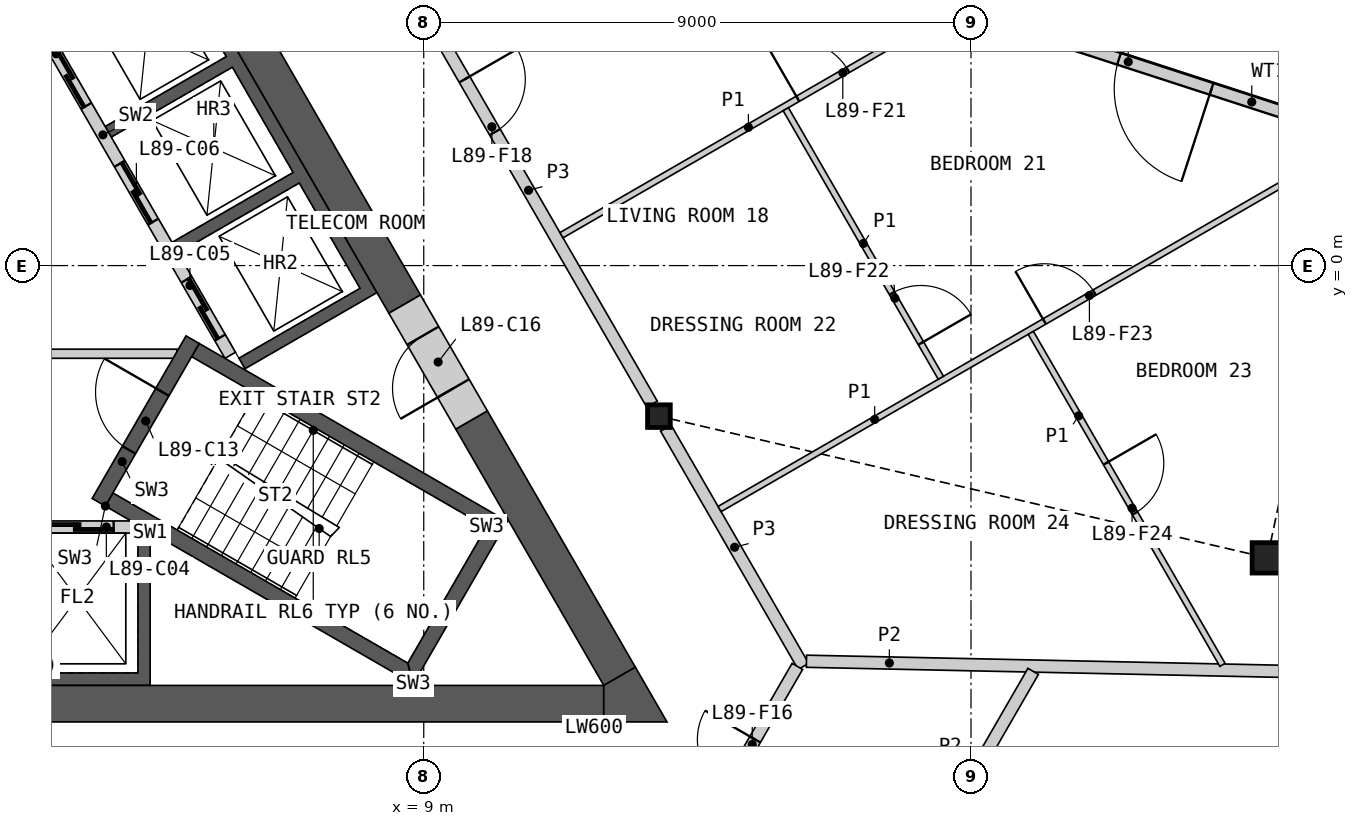
"""IFC4 building model, lengths in metres.
Left out: names, types, materials, properties, quantities, classifications, styles, units other than length and angle.
Written with IfcOpenShell. Run it as: python <this file> out.ifc"""

import sys

from ifc_helpers import new_model, si_unit, direction, frame, frame_2d, origin, origin_2d, place, context, subcontext, project, spatial, polyline, rectangle, hollow_rectangle, i_section, outline, extrude, element, fill, save


model = new_model("IFC4")
c1 = context("Model", 3, precision=1e-05, world=origin(), true_north=direction((0.0, 1.0)))
c2 = subcontext(c1, "Body", "Model", "MODEL_VIEW")
j1 = project(units=[si_unit("LENGTHUNIT", "METRE"), si_unit("PLANEANGLEUNIT", "RADIAN")], contexts=[c1])
p1 = place(None, origin())
s1 = spatial("IfcSite", under=j1, at=p1, CompositionType="ELEMENT")
p2 = place(p1, origin())
s2 = spatial("IfcBuilding", under=s1, at=p2, CompositionType="ELEMENT")
p3 = place(p2, frame((0.0, 0.0, 391.6)))
s3 = spatial("IfcBuildingStorey", under=s2, at=p3, CompositionType="ELEMENT", Elevation=391.6)
p4 = place(p3, frame((22.874, -4.807, 0.0), z_axis=(0.0, 0.0, 1.0), x_axis=(1.0, 0.0, 0.0)))
e1 = element("IfcColumn", 1, at=p4, inside=s3, PredefinedType="COLUMN", context=c2, shape_type="SweptSolid", body=[
    extrude(hollow_rectangle(XDim=0.5, YDim=0.5, WallThickness=0.03, at=origin_2d()), origin(), (0.0, 0.0, 1.0), 3.4),
])
p5 = place(p3, frame((12.868, -2.476, 0.0), z_axis=(0.0, 0.0, 1.0), x_axis=(1.0, 0.0, 0.0)))
e2 = element("IfcColumn", 2, at=p5, inside=s3, PredefinedType="COLUMN", context=c2, shape_type="SweptSolid", body=[
    extrude(i_section(OverallWidth=0.374, OverallDepth=0.372, WebThickness=0.016, FlangeThickness=0.026, at=origin_2d()), origin(), (0.0, 0.0, 1.0), 3.4),
])
p6 = place(p3, frame((24.174, 2.185, 0.0), z_axis=(0.0, 0.0, 1.0), x_axis=(-0.951061473407, 0.309001737536, 0.0)))
e3 = element("IfcWall", 3, at=p6, inside=s3, PredefinedType="SOLIDWALL", context=c2, shape_type="SweptSolid", body=[
    extrude(rectangle(XDim=6.546, YDim=0.2, at=frame_2d((3.273, 0.0))), origin(), (0.0, 0.0, 1.0), 2.634),
])
p7 = place(p6, frame((2.333, 0.0, 0.0)))
e4 = element("IfcOpeningElement", 4, at=p7, cuts=e3, PredefinedType="OPENING", context=c2, shape_type="SweptSolid", body=[
    extrude(rectangle(XDim=1.6, YDim=2.25, at=frame_2d((0.8, 1.125))), frame((0.0, 0.11, 0.0), z_axis=(0.0, -1.0, 0.0), x_axis=(1.0, 0.0, 0.0)), (0.0, 0.0, 1.0), 0.22),
])
p8 = place(p3, origin())
e5 = element("IfcWall", 5, at=p8, inside=s3, PredefinedType="SHEAR", context=c2, shape_type="SweptSolid", body=[
    extrude(outline(polyline([(4.5, -4.4), (4.5, -6.906), (-4.5, -6.906), (-4.5, -4.4), (-4.3, -4.4), (-4.3, -6.7), (-2.3, -6.7), (-2.3, -4.4), (-2.1, -4.4), (-2.1, -6.7), (-0.1, -6.7), (-0.1, -4.4), (0.1, -4.4), (0.1, -6.7), (2.1, -6.7), (2.1, -4.4), (2.3, -4.4), (2.3, -6.7), (4.3, -6.7), (4.3, -4.4), (4.5, -4.4)])), origin(), (0.0, 0.0, 1.0), 3.1),
])
p9 = place(p3, frame((-4.187, -4.3, 0.0), z_axis=(0.0, 0.0, 1.0), x_axis=(1.0, 0.0, 0.0)))
e6 = element("IfcWall", 6, at=p9, inside=s3, PredefinedType="SOLIDWALL", context=c2, shape_type="SweptSolid", body=[
    extrude(rectangle(XDim=8.373, YDim=0.2, at=frame_2d((4.187, 0.0))), origin(), (0.0, 0.0, 1.0), 3.1),
])
p10 = place(p9, frame((0.287, 0.0, 0.0)))
e7 = element("IfcOpeningElement", 7, at=p10, cuts=e6, PredefinedType="OPENING", context=c2, shape_type="SweptSolid", body=[
    extrude(rectangle(XDim=1.2, YDim=2.1, at=frame_2d((0.6, 1.05))), frame((0.0, 0.11, 0.0), z_axis=(0.0, -1.0, 0.0), x_axis=(1.0, 0.0, 0.0)), (0.0, 0.0, 1.0), 0.22),
])
p11 = place(p9, frame((2.387, 0.0, 0.0)))
e8 = element("IfcOpeningElement", 8, at=p11, cuts=e6, PredefinedType="OPENING", context=c2, shape_type="SweptSolid", body=[
    extrude(rectangle(XDim=1.4, YDim=2.1, at=frame_2d((0.7, 1.05))), frame((0.0, 0.11, 0.0), z_axis=(0.0, -1.0, 0.0), x_axis=(1.0, 0.0, 0.0)), (0.0, 0.0, 1.0), 0.22),
])
p12 = place(p9, frame((4.737, 0.0, 0.0)))
e9 = element("IfcOpeningElement", 9, at=p12, cuts=e6, PredefinedType="OPENING", context=c2, shape_type="SweptSolid", body=[
    extrude(rectangle(XDim=1.1, YDim=2.1, at=frame_2d((0.55, 1.05))), frame((0.0, 0.11, 0.0), z_axis=(0.0, -1.0, 0.0), x_axis=(1.0, 0.0, 0.0)), (0.0, 0.0, 1.0), 0.22),
])
p13 = place(p9, frame((6.887, 0.0, 0.0)))
e10 = element("IfcOpeningElement", 10, at=p13, cuts=e6, PredefinedType="OPENING", context=c2, shape_type="SweptSolid", body=[
    extrude(rectangle(XDim=1.2, YDim=2.1, at=frame_2d((0.6, 1.05))), frame((0.0, 0.11, 0.0), z_axis=(0.0, -1.0, 0.0), x_axis=(1.0, 0.0, 0.0)), (0.0, 0.0, 1.0), 0.22),
])
p14 = place(p3, origin())
e11 = element("IfcWall", 11, at=p14, inside=s3, PredefinedType="SHEAR", context=c2, shape_type="SweptSolid", body=[
    extrude(outline(polyline([(1.561, 6.097), (3.731, 7.35), (8.231, -0.444), (6.061, -1.697), (5.96, -1.524), (7.952, -0.374), (6.952, 1.358), (4.96, 0.208), (4.861, 0.381), (6.852, 1.531), (5.852, 3.263), (3.861, 2.113), (3.76, 2.287), (5.752, 3.437), (4.752, 5.169), (2.76, 4.019), (2.66, 4.192), (4.652, 5.342), (3.652, 7.074), (1.66, 5.924), (1.561, 6.097)])), origin(), (0.0, 0.0, 1.0), 3.1),
])
p15 = place(p3, frame((5.817, -1.476, 0.0), z_axis=(0.0, 0.0, 1.0), x_axis=(-0.500002616675, 0.866023893041, 0.0)))
e12 = element("IfcWall", 12, at=p15, inside=s3, PredefinedType="SOLIDWALL", context=c2, shape_type="SweptSolid", body=[
    extrude(rectangle(XDim=8.373, YDim=0.2, at=frame_2d((4.187, 0.0))), origin(), (0.0, 0.0, 1.0), 3.1),
])
p16 = place(p15, frame((0.337, 0.0, 0.0)))
e13 = element("IfcOpeningElement", 13, at=p16, cuts=e12, PredefinedType="OPENING", context=c2, shape_type="SweptSolid", body=[
    extrude(rectangle(XDim=1.1, YDim=2.1, at=frame_2d((0.55, 1.05))), frame((0.0, 0.11, 0.0), z_axis=(0.0, -1.0, 0.0), x_axis=(1.0, 0.0, 0.0)), (0.0, 0.0, 1.0), 0.22),
])
p17 = place(p15, frame((2.537, 0.0, 0.0)))
e14 = element("IfcOpeningElement", 14, at=p17, cuts=e12, PredefinedType="OPENING", context=c2, shape_type="SweptSolid", body=[
    extrude(rectangle(XDim=1.1, YDim=2.1, at=frame_2d((0.55, 1.05))), frame((0.0, 0.11, 0.0), z_axis=(0.0, -1.0, 0.0), x_axis=(1.0, 0.0, 0.0)), (0.0, 0.0, 1.0), 0.22),
])
p18 = place(p15, frame((4.737, 0.0, 0.0)))
e15 = element("IfcOpeningElement", 15, at=p18, cuts=e12, PredefinedType="OPENING", context=c2, shape_type="SweptSolid", body=[
    extrude(rectangle(XDim=1.1, YDim=2.1, at=frame_2d((0.55, 1.05))), frame((0.0, 0.11, 0.0), z_axis=(0.0, -1.0, 0.0), x_axis=(1.0, 0.0, 0.0)), (0.0, 0.0, 1.0), 0.22),
])
p19 = place(p15, frame((7.037, 0.0, 0.0)))
e16 = element("IfcOpeningElement", 16, at=p19, cuts=e12, PredefinedType="OPENING", context=c2, shape_type="SweptSolid", body=[
    extrude(rectangle(XDim=0.9, YDim=2.1, at=frame_2d((0.45, 1.05))), frame((0.0, 0.11, 0.0), z_axis=(0.0, -1.0, 0.0), x_axis=(1.0, 0.0, 0.0)), (0.0, 0.0, 1.0), 0.22),
])
p20 = place(p3, frame((-4.941, -1.45, 0.0), z_axis=(0.0, 0.0, 1.0), x_axis=(1.0, 0.0, 0.0)))
e17 = element("IfcWall", 17, at=p20, inside=s3, PredefinedType="PARTITIONING", context=c2, shape_type="SweptSolid", body=[
    extrude(rectangle(XDim=9.882, YDim=0.15, at=frame_2d((4.941, 0.0))), origin(), (0.0, 0.0, 1.0), 3.1),
])
p21 = place(p20, frame((4.391, 0.0, 0.0)))
e18 = element("IfcOpeningElement", 18, at=p21, cuts=e17, PredefinedType="OPENING", context=c2, shape_type="SweptSolid", body=[
    extrude(rectangle(XDim=1.1, YDim=2.1, at=frame_2d((0.55, 1.05))), frame((0.0, 0.085, 0.0), z_axis=(0.0, -1.0, 0.0), x_axis=(1.0, 0.0, 0.0)), (0.0, 0.0, 1.0), 0.17),
])
p22 = place(p3, origin())
e19 = element("IfcWall", 19, at=p22, inside=s3, PredefinedType="SHEAR", context=c2, shape_type="SweptSolid", body=[
    extrude(outline(polyline([(3.763, -3.956), (8.83, -6.881), (8.738, -6.539), (3.888, -3.739), (3.763, -3.956)])), origin(), (0.0, 0.0, 1.0), 3.1),
])
p23 = place(p3, origin())
e20 = element("IfcWall", 20, at=p23, inside=s3, PredefinedType="SHEAR", context=c2, shape_type="SweptSolid", body=[
    extrude(outline(polyline([(8.83, -6.881), (10.374, -4.206), (10.032, -4.298), (8.738, -6.539), (8.83, -6.881)])), origin(), (0.0, 0.0, 1.0), 3.1),
])
p24 = place(p3, origin())
e21 = element("IfcWall", 21, at=p24, inside=s3, PredefinedType="SHEAR", context=c2, shape_type="SweptSolid", body=[
    extrude(outline(polyline([(10.032, -4.298), (10.374, -4.206), (5.307, -1.281), (5.182, -1.498), (10.032, -4.298)])), origin(), (0.0, 0.0, 1.0), 3.1),
])
p25 = place(p3, frame((3.655, -3.893, 0.0), z_axis=(0.0, 0.0, 1.0), x_axis=(0.499982516597, 0.866035497597, 0.0)))
e22 = element("IfcWall", 22, at=p25, inside=s3, PredefinedType="SHEAR", context=c2, shape_type="SweptSolid", body=[
    extrude(rectangle(XDim=3.088, YDim=0.25, at=frame_2d((1.544, 0.0))), origin(), (0.0, 0.0, 1.0), 3.1),
])
p26 = place(p25, frame((0.994, 0.0, 0.0)))
e23 = element("IfcOpeningElement", 23, at=p26, cuts=e22, PredefinedType="OPENING", context=c2, shape_type="SweptSolid", body=[
    extrude(rectangle(XDim=1.1, YDim=2.1, at=frame_2d((0.55, 1.05))), frame((0.0, 0.135, 0.0), z_axis=(0.0, -1.0, 0.0), x_axis=(1.0, 0.0, 0.0)), (0.0, 0.0, 1.0), 0.27),
])
p27 = place(p3, frame((-11.961, -7.206, 0.0), z_axis=(0.0, 0.0, 1.0), x_axis=(1.0, 0.0, 0.0)))
e24 = element("IfcWall", 24, at=p27, inside=s3, PredefinedType="SHEAR", context=c2, shape_type="SweptSolid", body=[
    extrude(rectangle(XDim=23.921, YDim=0.6, at=frame_2d((11.961, 0.0))), origin(), (0.0, 0.0, 1.0), 3.1),
])
p28 = place(p3, frame((8.686, -0.634, 0.0), z_axis=(0.0, 0.0, 1.0), x_axis=(-0.50001836461, 0.866014800712, 0.0)))
e25 = element("IfcWall", 25, at=p28, inside=s3, PredefinedType="SHEAR", context=c2, shape_type="SweptSolid", body=[
    extrude(rectangle(XDim=10.451, YDim=0.6, at=frame_2d((5.225, 0.0))), origin(), (0.0, 0.0, 1.0), 3.1),
])
p29 = place(p3, frame((12.221, -6.756, 0.0), z_axis=(0.0, 0.0, 1.0), x_axis=(-0.50000604952, 0.866021911064, 0.0)))
e26 = element("IfcWall", 26, at=p29, inside=s3, PredefinedType="SHEAR", context=c2, shape_type="SweptSolid", body=[
    extrude(rectangle(XDim=4.869, YDim=0.6, at=frame_2d((2.434, 0.0))), origin(), (0.0, 0.0, 1.0), 3.1),
])
p30 = place(p3, origin())
e27 = element("IfcWall", 27, at=p30, inside=s3, PredefinedType="SHEAR", context=c2, shape_type="SweptSolid", body=[
    extrude(outline(polyline([(11.961, -7.506), (11.961, -6.906), (12.48, -6.606), (13.0, -7.506), (11.961, -7.506)])), origin(), (0.0, 0.0, 1.0), 3.1),
])
p31 = place(p3, frame((9.786, -2.539, 0.0), z_axis=(0.0, 0.0, 1.0), x_axis=(-0.499981787252, 0.866035918664, 0.0)))
e28 = element("IfcWall", 28, at=p31, inside=s3, PredefinedType="SHEAR", context=c2, shape_type="SweptSolid", body=[
    extrude(rectangle(XDim=2.2, YDim=0.6, at=frame_2d((1.1, 0.0))), origin(), (0.0, 0.0, 1.0), 3.1),
])
p32 = place(p31, frame((0.6, 0.0, 0.0)))
e29 = element("IfcOpeningElement", 29, at=p32, cuts=e28, PredefinedType="OPENING", context=c2, shape_type="SweptSolid", body=[
    extrude(rectangle(XDim=1.0, YDim=2.1, at=frame_2d((0.5, 1.05))), frame((0.0, 0.31, 0.0), z_axis=(0.0, -1.0, 0.0), x_axis=(1.0, 0.0, 0.0)), (0.0, 0.0, 1.0), 0.62),
])
p33 = place(p3, frame((8.692, 4.756, 0.0), z_axis=(0.0, 0.0, 1.0), x_axis=(0.500001682468, -0.866024432409, 0.0)))
e30 = element("IfcWall", 30, at=p33, inside=s3, PredefinedType="PARTITIONING", context=c2, shape_type="SweptSolid", body=[
    extrude(rectangle(XDim=8.124, YDim=0.2, at=frame_2d((4.062, 0.0))), origin(), (0.0, 0.0, 1.0), 3.1),
])
p34 = place(p33, frame((1.956, 0.0, 0.0)))
e31 = element("IfcOpeningElement", 31, at=p34, cuts=e30, PredefinedType="OPENING", context=c2, shape_type="SweptSolid", body=[
    extrude(rectangle(XDim=1.0, YDim=2.1, at=frame_2d((0.5, 1.05))), frame((0.0, 0.11, 0.0), z_axis=(0.0, -1.0, 0.0), x_axis=(1.0, 0.0, 0.0)), (0.0, 0.0, 1.0), 0.22),
])
p35 = place(p3, frame((12.981, -2.673, 0.0), z_axis=(0.0, 0.0, 1.0), x_axis=(0.499974648164, -0.866040040179, 0.0)))
e32 = element("IfcWall", 32, at=p35, inside=s3, PredefinedType="PARTITIONING", context=c2, shape_type="SweptSolid", body=[
    extrude(rectangle(XDim=4.525, YDim=0.2, at=frame_2d((2.263, 0.0))), origin(), (0.0, 0.0, 1.0), 3.1),
])
p36 = place(p3, frame((13.281, -9.819, 0.0), z_axis=(0.0, 0.0, 1.0), x_axis=(0.499958791762, 0.866049194065, 0.0)))
e33 = element("IfcWall", 33, at=p36, inside=s3, PredefinedType="PARTITIONING", context=c2, shape_type="SweptSolid", body=[
    extrude(rectangle(XDim=3.726, YDim=0.2, at=frame_2d((1.863, 0.0))), origin(), (0.0, 0.0, 1.0), 3.1),
])
p37 = place(p36, frame((1.388, 0.0, 0.0)))
e34 = element("IfcOpeningElement", 34, at=p37, cuts=e33, PredefinedType="OPENING", context=c2, shape_type="SweptSolid", body=[
    extrude(rectangle(XDim=0.95, YDim=2.1, at=frame_2d((0.475, 1.05))), frame((0.0, 0.11, 0.0), z_axis=(0.0, -1.0, 0.0), x_axis=(1.0, 0.0, 0.0)), (0.0, 0.0, 1.0), 0.22),
])
p38 = place(p3, frame((15.294, -6.508, 0.0), z_axis=(0.0, 0.0, 1.0), x_axis=(0.999775726416, -0.02117774467, 0.0)))
e35 = element("IfcWall", 35, at=p38, inside=s3, PredefinedType="PARTITIONING", context=c2, shape_type="SweptSolid", body=[
    extrude(rectangle(XDim=13.638, YDim=0.2, at=frame_2d((6.819, 0.0))), origin(), (0.0, 0.0, 1.0), 2.33),
])
p39 = place(p3, frame((17.271, -9.708, 0.0), z_axis=(0.0, 0.0, 1.0), x_axis=(0.499983843005, 0.866034731829, 0.0)))
e36 = element("IfcWall", 36, at=p39, inside=s3, PredefinedType="PARTITIONING", context=c2, shape_type="SweptSolid", body=[
    extrude(rectangle(XDim=3.503, YDim=0.2, at=frame_2d((1.752, 0.0))), origin(), (0.0, 0.0, 1.0), 2.33),
])
p40 = place(p3, frame((13.865, -4.004, 0.0), z_axis=(0.0, 0.0, 1.0), x_axis=(0.866023404247, 0.500003463284, 0.0)))
e37 = element("IfcWall", 37, at=p40, inside=s3, PredefinedType="PARTITIONING", context=c2, shape_type="SweptSolid", body=[
    extrude(rectangle(XDim=11.782, YDim=0.1, at=frame_2d((5.891, 0.0))), origin(), (0.0, 0.0, 1.0), 2.33),
])
p41 = place(p40, frame((6.168, 0.0, 0.0)))
e38 = element("IfcOpeningElement", 38, at=p41, cuts=e37, PredefinedType="OPENING", context=c2, shape_type="SweptSolid", body=[
    extrude(rectangle(XDim=0.95, YDim=2.1, at=frame_2d((0.475, 1.05))), frame((0.0, 0.06, 0.0), z_axis=(0.0, -1.0, 0.0), x_axis=(1.0, 0.0, 0.0)), (0.0, 0.0, 1.0), 0.12),
])
p42 = place(p3, frame((11.265, 0.5, 0.0), z_axis=(0.0, 0.0, 1.0), x_axis=(0.866033839264, 0.499985389037, 0.0)))
e39 = element("IfcWall", 39, at=p42, inside=s3, PredefinedType="PARTITIONING", context=c2, shape_type="SweptSolid", body=[
    extrude(rectangle(XDim=7.1, YDim=0.1, at=frame_2d((3.55, 0.0))), origin(), (0.0, 0.0, 1.0), 2.33),
])
p43 = place(p42, frame((4.488, 0.0, 0.0)))
e40 = element("IfcOpeningElement", 40, at=p43, cuts=e39, PredefinedType="OPENING", context=c2, shape_type="SweptSolid", body=[
    extrude(rectangle(XDim=0.95, YDim=2.1, at=frame_2d((0.475, 1.05))), frame((0.0, 0.06, 0.0), z_axis=(0.0, -1.0, 0.0), x_axis=(1.0, 0.0, 0.0)), (0.0, 0.0, 1.0), 0.12),
])
p44 = place(p3, frame((18.983, -1.107, 0.0), z_axis=(0.0, 0.0, 1.0), x_axis=(0.500016298831, -0.866015993445, 0.0)))
e41 = element("IfcWall", 41, at=p44, inside=s3, PredefinedType="PARTITIONING", context=c2, shape_type="SweptSolid", body=[
    extrude(rectangle(XDim=6.305, YDim=0.1, at=frame_2d((3.152, 0.0))), origin(), (0.0, 0.0, 1.0), 2.33),
])
p45 = place(p44, frame((2.475, 0.0, 0.0)))
e42 = element("IfcOpeningElement", 42, at=p45, cuts=e41, PredefinedType="OPENING", context=c2, shape_type="SweptSolid", body=[
    extrude(rectangle(XDim=0.95, YDim=2.1, at=frame_2d((0.475, 1.05))), frame((0.0, 0.06, 0.0), z_axis=(0.0, -1.0, 0.0), x_axis=(1.0, 0.0, 0.0)), (0.0, 0.0, 1.0), 0.12),
])
p46 = place(p3, frame((14.954, 2.572, 0.0), z_axis=(0.0, 0.0, 1.0), x_axis=(0.499984882974, -0.866034131428, 0.0)))
e43 = element("IfcWall", 43, at=p46, inside=s3, PredefinedType="PARTITIONING", context=c2, shape_type="SweptSolid", body=[
    extrude(rectangle(XDim=5.1, YDim=0.1, at=frame_2d((2.55, 0.0))), origin(), (0.0, 0.0, 1.0), 2.33),
])
p47 = place(p46, frame((3.494, 0.0, 0.0)))
e44 = element("IfcOpeningElement", 44, at=p47, cuts=e43, PredefinedType="OPENING", context=c2, shape_type="SweptSolid", body=[
    extrude(rectangle(XDim=0.95, YDim=2.1, at=frame_2d((0.475, 1.05))), frame((0.0, 0.06, 0.0), z_axis=(0.0, -1.0, 0.0), x_axis=(1.0, 0.0, 0.0)), (0.0, 0.0, 1.0), 0.12),
])
p48 = place(p7, origin())
e45 = element("IfcDoor", 45, at=p48, inside=s3, OperationType="DOUBLE_DOOR_SINGLE_SWING", PredefinedType="DOOR", context=c2, shape_type="SweptSolid", body=[
    extrude(rectangle(XDim=1.6, YDim=2.25, at=frame_2d((0.8, 1.125))), frame((0.0, 0.025, 0.0), z_axis=(0.0, -1.0, 0.0), x_axis=(1.0, 0.0, 0.0)), (0.0, 0.0, 1.0), 0.05),
])
fill(e4, e45)
p49 = place(p13, origin())
e46 = element("IfcDoor", 46, at=p49, inside=s3, OperationType="SLIDING_TO_LEFT", PredefinedType="DOOR", context=c2, shape_type="SweptSolid", body=[
    extrude(rectangle(XDim=1.2, YDim=2.1, at=frame_2d((0.6, 1.05))), frame((0.0, 0.025, 0.0), z_axis=(0.0, -1.0, 0.0), x_axis=(1.0, 0.0, 0.0)), (0.0, 0.0, 1.0), 0.05),
])
fill(e10, e46)
p50 = place(p16, origin())
e47 = element("IfcDoor", 47, at=p50, inside=s3, OperationType="SLIDING_TO_LEFT", PredefinedType="DOOR", context=c2, shape_type="SweptSolid", body=[
    extrude(rectangle(XDim=1.1, YDim=2.1, at=frame_2d((0.55, 1.05))), frame((0.0, 0.025, 0.0), z_axis=(0.0, -1.0, 0.0), x_axis=(1.0, 0.0, 0.0)), (0.0, 0.0, 1.0), 0.05),
])
fill(e13, e47)
p51 = place(p17, origin())
e48 = element("IfcDoor", 48, at=p51, inside=s3, OperationType="SLIDING_TO_LEFT", PredefinedType="DOOR", context=c2, shape_type="SweptSolid", body=[
    extrude(rectangle(XDim=1.1, YDim=2.1, at=frame_2d((0.55, 1.05))), frame((0.0, 0.025, 0.0), z_axis=(0.0, -1.0, 0.0), x_axis=(1.0, 0.0, 0.0)), (0.0, 0.0, 1.0), 0.05),
])
fill(e14, e48)
p52 = place(p18, origin())
e49 = element("IfcDoor", 49, at=p52, inside=s3, OperationType="SLIDING_TO_LEFT", PredefinedType="DOOR", context=c2, shape_type="SweptSolid", body=[
    extrude(rectangle(XDim=1.1, YDim=2.1, at=frame_2d((0.55, 1.05))), frame((0.0, 0.025, 0.0), z_axis=(0.0, -1.0, 0.0), x_axis=(1.0, 0.0, 0.0)), (0.0, 0.0, 1.0), 0.05),
])
fill(e15, e49)
p53 = place(p26, origin())
e50 = element("IfcDoor", 50, at=p53, inside=s3, OperationType="SINGLE_SWING_RIGHT", PredefinedType="DOOR", context=c2, shape_type="SweptSolid", body=[
    extrude(rectangle(XDim=1.1, YDim=2.1, at=frame_2d((0.55, 1.05))), frame((0.0, 0.025, 0.0), z_axis=(0.0, -1.0, 0.0), x_axis=(1.0, 0.0, 0.0)), (0.0, 0.0, 1.0), 0.05),
])
fill(e23, e50)
p54 = place(p32, origin())
e51 = element("IfcDoor", 51, at=p54, inside=s3, OperationType="SINGLE_SWING_LEFT", PredefinedType="DOOR", context=c2, shape_type="SweptSolid", body=[
    extrude(rectangle(XDim=1.0, YDim=2.1, at=frame_2d((0.5, 1.05))), frame((0.0, 0.055, 0.0), z_axis=(0.0, -1.0, 0.0), x_axis=(1.0, 0.0, 0.0)), (0.0, 0.0, 1.0), 0.05),
])
fill(e29, e51)
p55 = place(p37, origin())
e52 = element("IfcDoor", 52, at=p55, inside=s3, OperationType="SINGLE_SWING_RIGHT", PredefinedType="DOOR", context=c2, shape_type="SweptSolid", body=[
    extrude(rectangle(XDim=0.95, YDim=2.1, at=frame_2d((0.475, 1.05))), frame((0.0, 0.025, 0.0), z_axis=(0.0, -1.0, 0.0), x_axis=(1.0, 0.0, 0.0)), (0.0, 0.0, 1.0), 0.05),
])
fill(e34, e52)
p56 = place(p34, origin())
e53 = element("IfcDoor", 53, at=p56, inside=s3, OperationType="SINGLE_SWING_LEFT", PredefinedType="DOOR", context=c2, shape_type="SweptSolid", body=[
    extrude(rectangle(XDim=1.0, YDim=2.1, at=frame_2d((0.5, 1.05))), frame((0.0, 0.025, 0.0), z_axis=(0.0, -1.0, 0.0), x_axis=(1.0, 0.0, 0.0)), (0.0, 0.0, 1.0), 0.05),
])
fill(e31, e53)
p57 = place(p43, origin())
e54 = element("IfcDoor", 54, at=p57, inside=s3, OperationType="SINGLE_SWING_LEFT", PredefinedType="DOOR", context=c2, shape_type="SweptSolid", body=[
    extrude(rectangle(XDim=0.95, YDim=2.1, at=frame_2d((0.475, 1.05))), frame((0.0, 0.025, 0.0), z_axis=(0.0, -1.0, 0.0), x_axis=(1.0, 0.0, 0.0)), (0.0, 0.0, 1.0), 0.05),
])
fill(e40, e54)
p58 = place(p47, origin())
e55 = element("IfcDoor", 55, at=p58, inside=s3, OperationType="SINGLE_SWING_RIGHT", PredefinedType="DOOR", context=c2, shape_type="SweptSolid", body=[
    extrude(rectangle(XDim=0.95, YDim=2.1, at=frame_2d((0.475, 1.05))), frame((0.0, 0.025, 0.0), z_axis=(0.0, -1.0, 0.0), x_axis=(1.0, 0.0, 0.0)), (0.0, 0.0, 1.0), 0.05),
])
fill(e44, e55)
p59 = place(p41, origin())
e56 = element("IfcDoor", 56, at=p59, inside=s3, OperationType="SINGLE_SWING_LEFT", PredefinedType="DOOR", context=c2, shape_type="SweptSolid", body=[
    extrude(rectangle(XDim=0.95, YDim=2.1, at=frame_2d((0.475, 1.05))), frame((0.0, 0.025, 0.0), z_axis=(0.0, -1.0, 0.0), x_axis=(1.0, 0.0, 0.0)), (0.0, 0.0, 1.0), 0.05),
])
fill(e38, e56)
p60 = place(p45, origin())
e57 = element("IfcDoor", 57, at=p60, inside=s3, OperationType="SINGLE_SWING_LEFT", PredefinedType="DOOR", context=c2, shape_type="SweptSolid", body=[
    extrude(rectangle(XDim=0.95, YDim=2.1, at=frame_2d((0.475, 1.05))), frame((0.0, 0.025, 0.0), z_axis=(0.0, -1.0, 0.0), x_axis=(1.0, 0.0, 0.0)), (0.0, 0.0, 1.0), 0.05),
])
fill(e42, e57)
save(model, sys.argv[1])
